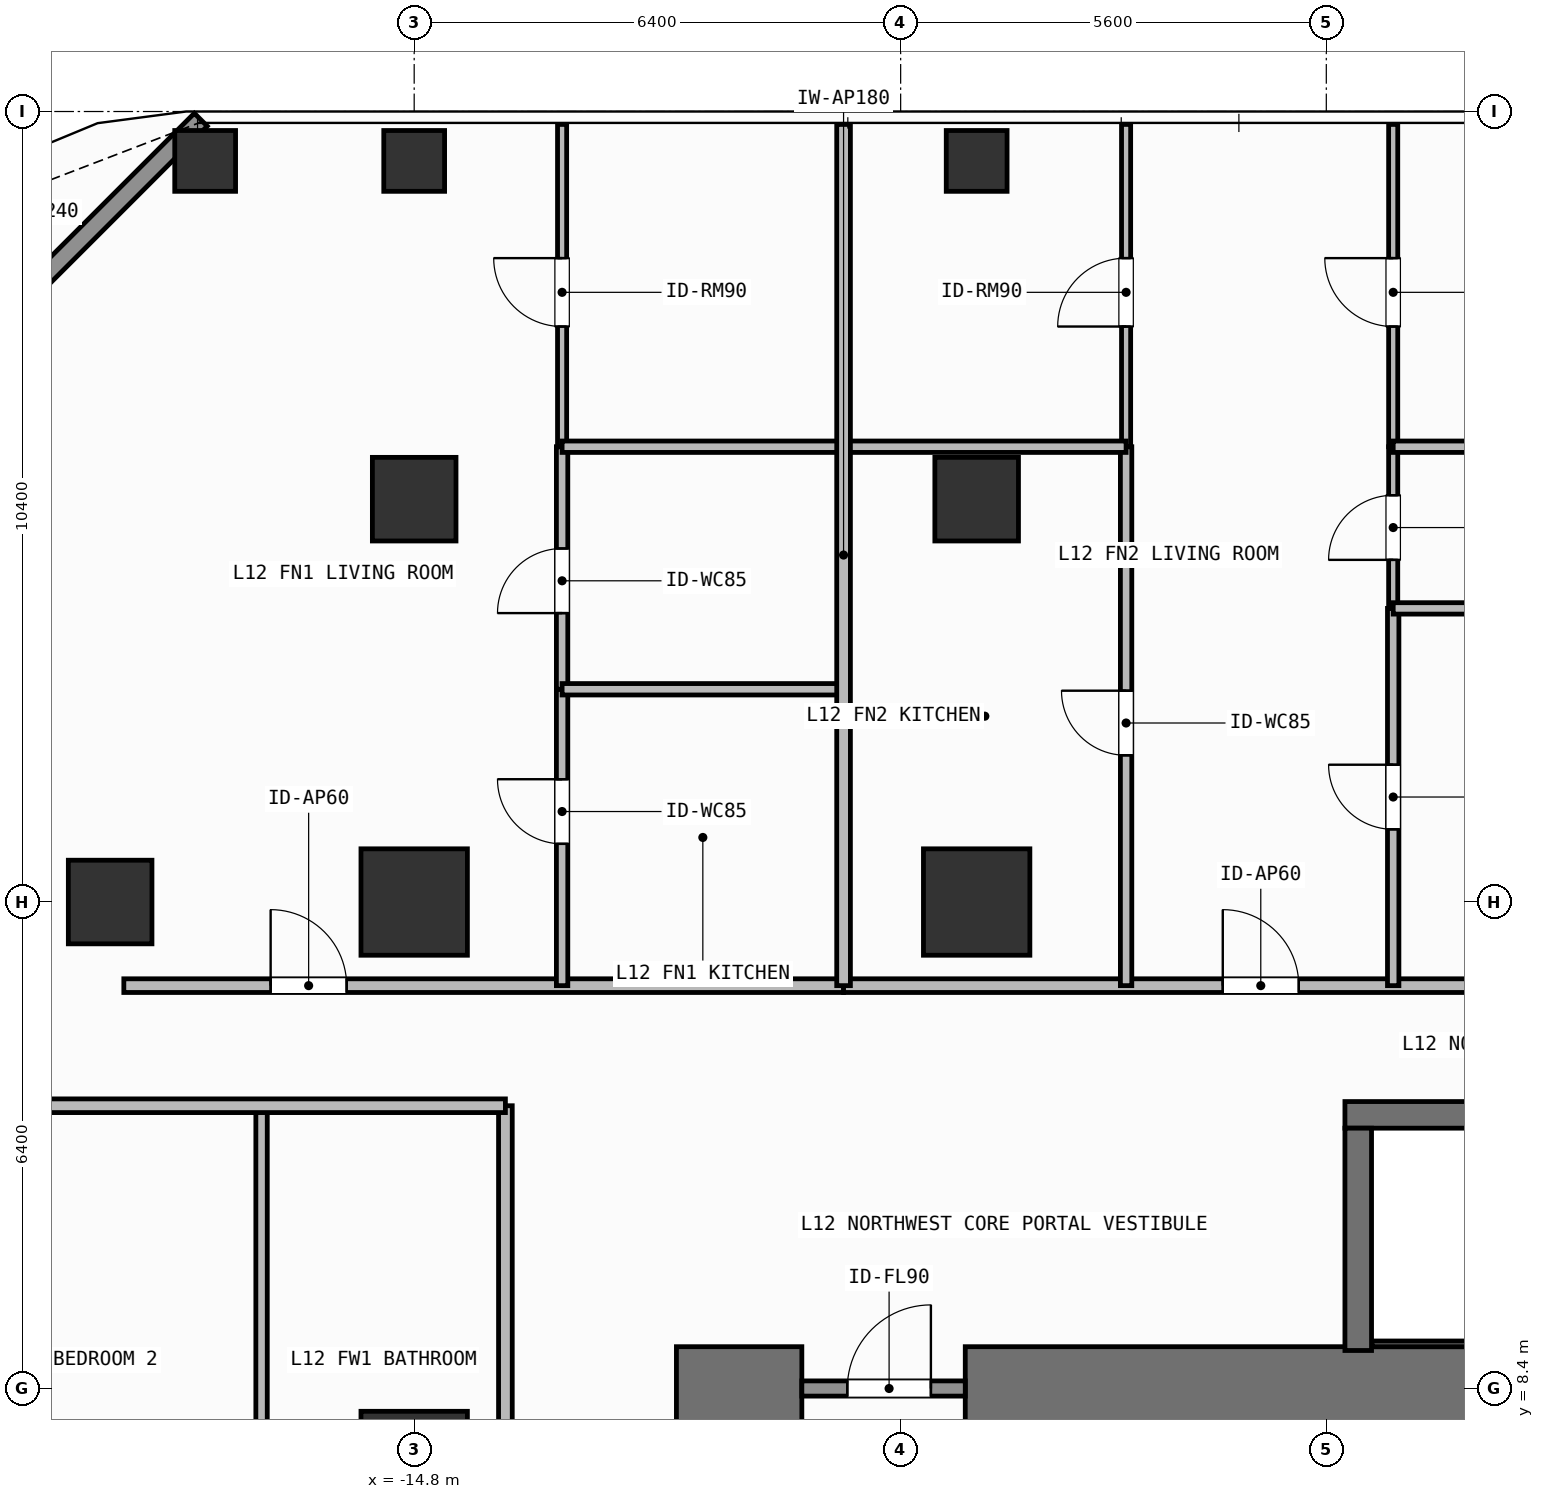
"""IFC4 building model, lengths in metres.
Left out: names, types, materials, properties, quantities, classifications, styles, units other than length and angle.
Written with IfcOpenShell. Run it as: python <this file> out.ifc"""

import sys

from ifc_helpers import new_model, si_unit, direction, frame, frame_2d, origin, origin_2d, place, context, subcontext, project, spatial, rectangle, hollow_rectangle, extrude, element, fill, save


model = new_model("IFC4")
c1 = context("Model", 3, precision=1e-05, world=origin(), true_north=direction((0.0, 1.0)))
c2 = subcontext(c1, "Body", "Model", "MODEL_VIEW")
j1 = project(units=[si_unit("LENGTHUNIT", "METRE"), si_unit("PLANEANGLEUNIT", "RADIAN")], contexts=[c1])
p1 = place(None, origin())
s1 = spatial("IfcSite", under=j1, at=p1, CompositionType="ELEMENT")
p2 = place(p1, origin())
s2 = spatial("IfcBuilding", under=s1, at=p2, CompositionType="ELEMENT")
p3 = place(p2, frame((0.0, 0.0, 46.2)))
s3 = spatial("IfcBuildingStorey", under=s2, at=p3, CompositionType="ELEMENT", Elevation=46.2)
p4 = place(p3, frame((-11.35, 8.4, 0.0), z_axis=(0.0, 0.0, 1.0), x_axis=(1.0, 0.0, 0.0)))
e1 = element("IfcWall", 1, at=p4, inside=s3, PredefinedType="SHEAR", context=c2, shape_type="SweptSolid", body=[
    extrude(rectangle(XDim=1.65, YDim=1.1, at=frame_2d((0.825, 0.0))), origin(), (0.0, 0.0, 1.0), 3.9),
])
p5 = place(p3, frame((-7.55, 8.4, 0.0), z_axis=(0.0, 0.0, 1.0), x_axis=(1.0, 0.0, 0.0)))
e2 = element("IfcWall", 2, at=p5, inside=s3, PredefinedType="SHEAR", context=c2, shape_type="SweptSolid", body=[
    extrude(rectangle(XDim=16.5, YDim=1.1, at=frame_2d((8.25, 0.0))), origin(), (0.0, 0.0, 1.0), 3.9),
])
p6 = place(p3, frame((-2.555, 12.0, 0.0), z_axis=(0.0, 0.0, 1.0), x_axis=(1.0, 0.0, 0.0)))
e3 = element("IfcWall", 3, at=p6, inside=s3, PredefinedType="SHEAR", context=c2, shape_type="SweptSolid", body=[
    extrude(rectangle(XDim=7.31, YDim=0.35, at=frame_2d((3.655, 0.0))), origin(), (0.0, 0.0, 1.0), 3.9),
])
p7 = place(p3, frame((-2.2, 8.988, 0.0), z_axis=(0.0, 0.0, 1.0), x_axis=(1.0, 0.0, 0.0)))
e4 = element("IfcWall", 4, at=p7, inside=s3, PredefinedType="SHEAR", context=c2, shape_type="SweptSolid", body=[
    extrude(rectangle(XDim=6.6, YDim=0.075, at=frame_2d((3.3, 0.0))), origin(), (0.0, 0.0, 1.0), 3.9),
])
p8 = place(p3, frame((-2.38, 8.9, 0.0), z_axis=(0.0, 0.0, 1.0), x_axis=(0.0, 1.0, 0.0)))
e5 = element("IfcWall", 5, at=p8, inside=s3, PredefinedType="SHEAR", context=c2, shape_type="SweptSolid", body=[
    extrude(rectangle(XDim=2.925, YDim=0.35, at=frame_2d((1.462, 0.0))), origin(), (0.0, 0.0, 1.0), 3.9),
])
for number, where, z_axis, x_axis in (
    (6, (-14.8, 14.8, 0.0), (0.0, 0.0, 1.0), (1.0, 0.0, 0.0)),
    (7, (-7.4, 14.8, 0.0), (0.0, 0.0, 1.0), (1.0, 0.0, 0.0)),
    (8, (-14.8, 7.4, 0.0), (0.0, 0.0, 1.0), (1.0, 0.0, 0.0)),
):
    element("IfcColumn", number, at=place(p3, frame(where, z_axis=z_axis, x_axis=x_axis)), inside=s3, PredefinedType="COLUMN", context=c2, shape_type="SweptSolid", body=[
        extrude(rectangle(XDim=1.4, YDim=1.4, at=origin_2d()), origin(), (0.0, 0.0, 1.0), 3.9),
    ])
for number, where, z_axis, x_axis in (
    (9, (-18.8, 14.8, 0.0), (0.0, 0.0, 1.0), (1.0, 0.0, 0.0)),
    (10, (-14.8, 20.1, 0.0), (0.0, 0.0, 1.0), (1.0, 0.0, 0.0)),
    (11, (-7.4, 20.1, 0.0), (0.0, 0.0, 1.0), (1.0, 0.0, 0.0)),
):
    element("IfcColumn", number, at=place(p3, frame(where, z_axis=z_axis, x_axis=x_axis)), inside=s3, PredefinedType="COLUMN", context=c2, shape_type="SweptSolid", body=[
        extrude(rectangle(XDim=1.1, YDim=1.1, at=origin_2d()), origin(), (0.0, 0.0, 1.0), 3.9),
    ])
for number, where, z_axis, x_axis in (
    (12, (-17.55, 24.55, 0.0), (0.0, 0.0, 1.0), (1.0, 0.0, 0.0)),
    (13, (-14.8, 24.55, 0.0), (0.0, 0.0, 1.0), (1.0, 0.0, 0.0)),
    (14, (-7.4, 24.55, 0.0), (0.0, 0.0, 1.0), (1.0, 0.0, 0.0)),
):
    element("IfcColumn", number, at=place(p3, frame(where, z_axis=z_axis, x_axis=x_axis)), inside=s3, PredefinedType="COLUMN", context=c2, shape_type="SweptSolid", body=[
        extrude(hollow_rectangle(XDim=0.8, YDim=0.8, WallThickness=0.036, at=origin_2d()), origin(), (0.0, 0.0, 1.0), 3.9),
    ])
p9 = place(p3, frame((-22.192, 20.508, 0.0), z_axis=(0.0, 0.0, 1.0), x_axis=(0.707106781187, 0.707106781187, 0.0)))
e15 = element("IfcWall", 15, at=p9, inside=s3, PredefinedType="SOLIDWALL", context=c2, shape_type="SweptSolid", body=[
    extrude(rectangle(XDim=6.484, YDim=0.24, at=frame_2d((3.242, 0.0))), origin(), (0.0, 0.0, 1.0), 3.68),
])
p10 = place(p3, frame((-9.7, 8.4, 0.0), z_axis=(0.0, 0.0, 1.0), x_axis=(1.0, 0.0, 0.0)))
e16 = element("IfcWall", 16, at=p10, inside=s3, PredefinedType="SOLIDWALL", context=c2, shape_type="SweptSolid", body=[
    extrude(rectangle(XDim=2.15, YDim=0.2, at=frame_2d((1.075, 0.0))), origin(), (0.0, 0.0, 1.0), 2.72),
])
p11 = place(p10, frame((0.598, 0.0, 0.0)))
e17 = element("IfcOpeningElement", 17, at=p11, cuts=e16, PredefinedType="OPENING", context=c2, shape_type="SweptSolid", body=[
    extrude(rectangle(XDim=1.1, YDim=2.15, at=frame_2d((0.55, 1.075))), frame((0.0, 0.11, 0.0), z_axis=(0.0, -1.0, 0.0), x_axis=(1.0, 0.0, 0.0)), (0.0, 0.0, 1.0), 0.22),
])
p12 = place(p3, frame((-18.62, 13.7, 0.0), z_axis=(0.0, 0.0, 1.0), x_axis=(1.0, 0.0, 0.0)))
e18 = element("IfcWall", 18, at=p12, inside=s3, PredefinedType="PARTITIONING", context=c2, shape_type="SweptSolid", body=[
    extrude(rectangle(XDim=9.469, YDim=0.18, at=frame_2d((4.735, 0.0))), origin(), (0.0, 0.0, 1.0), 3.68),
])
p13 = place(p12, frame((1.931, 0.0, 0.0)))
e19 = element("IfcOpeningElement", 19, at=p13, cuts=e18, PredefinedType="OPENING", context=c2, shape_type="SweptSolid", body=[
    extrude(rectangle(XDim=1.0, YDim=2.2, at=frame_2d((0.5, 1.1))), frame((0.0, 0.1, 0.0), z_axis=(0.0, -1.0, 0.0), x_axis=(1.0, 0.0, 0.0)), (0.0, 0.0, 1.0), 0.2),
])
p14 = place(p3, frame((-12.854, 13.7, 0.0), z_axis=(0.0, 0.0, 1.0), x_axis=(0.0, 1.0, 0.0)))
e20 = element("IfcWall", 20, at=p14, inside=s3, PredefinedType="PARTITIONING", context=c2, shape_type="SweptSolid", body=[
    extrude(rectangle(XDim=3.899, YDim=0.15, at=frame_2d((1.95, 0.0))), origin(), (0.0, 0.0, 1.0), 3.68),
])
p15 = place(p14, frame((1.865, 0.0, 0.0)))
e21 = element("IfcOpeningElement", 21, at=p15, cuts=e20, PredefinedType="OPENING", context=c2, shape_type="SweptSolid", body=[
    extrude(rectangle(XDim=0.85, YDim=2.1, at=frame_2d((0.425, 1.05))), frame((0.0, 0.085, 0.0), z_axis=(0.0, -1.0, 0.0), x_axis=(1.0, 0.0, 0.0)), (0.0, 0.0, 1.0), 0.17),
])
p16 = place(p3, frame((-12.854, 17.599, 0.0), z_axis=(0.0, 0.0, 1.0), x_axis=(0.0, 1.0, 0.0)))
e22 = element("IfcWall", 22, at=p16, inside=s3, PredefinedType="PARTITIONING", context=c2, shape_type="SweptSolid", body=[
    extrude(rectangle(XDim=3.191, YDim=0.15, at=frame_2d((1.595, 0.0))), origin(), (0.0, 0.0, 1.0), 3.68),
])
p17 = place(p16, frame((1.002, 0.0, 0.0)))
e23 = element("IfcOpeningElement", 23, at=p17, cuts=e22, PredefinedType="OPENING", context=c2, shape_type="SweptSolid", body=[
    extrude(rectangle(XDim=0.85, YDim=2.1, at=frame_2d((0.425, 1.05))), frame((0.0, 0.085, 0.0), z_axis=(0.0, -1.0, 0.0), x_axis=(1.0, 0.0, 0.0)), (0.0, 0.0, 1.0), 0.17),
])
p18 = place(p3, frame((-12.854, 20.79, 0.0), z_axis=(0.0, 0.0, 1.0), x_axis=(0.0, 1.0, 0.0)))
e24 = element("IfcWall", 24, at=p18, inside=s3, PredefinedType="PARTITIONING", context=c2, shape_type="SweptSolid", body=[
    extrude(rectangle(XDim=4.24, YDim=0.12, at=frame_2d((2.12, 0.0))), origin(), (0.0, 0.0, 1.0), 3.68),
])
p19 = place(p18, frame((1.581, 0.0, 0.0)))
e25 = element("IfcOpeningElement", 25, at=p19, cuts=e24, PredefinedType="OPENING", context=c2, shape_type="SweptSolid", body=[
    extrude(rectangle(XDim=0.9, YDim=2.1, at=frame_2d((0.45, 1.05))), frame((0.0, 0.07, 0.0), z_axis=(0.0, -1.0, 0.0), x_axis=(1.0, 0.0, 0.0)), (0.0, 0.0, 1.0), 0.14),
])
p20 = place(p3, frame((-9.151, 13.7, 0.0), z_axis=(0.0, 0.0, 1.0), x_axis=(1.0, 0.0, 0.0)))
e26 = element("IfcWall", 26, at=p20, inside=s3, PredefinedType="PARTITIONING", context=c2, shape_type="SweptSolid", body=[
    extrude(rectangle(XDim=12.051, YDim=0.18, at=frame_2d((6.025, 0.0))), origin(), (0.0, 0.0, 1.0), 3.68),
])
p21 = place(p20, frame((4.989, 0.0, 0.0)))
e27 = element("IfcOpeningElement", 27, at=p21, cuts=e26, PredefinedType="OPENING", context=c2, shape_type="SweptSolid", body=[
    extrude(rectangle(XDim=1.0, YDim=2.2, at=frame_2d((0.5, 1.1))), frame((0.0, 0.1, 0.0), z_axis=(0.0, -1.0, 0.0), x_axis=(1.0, 0.0, 0.0)), (0.0, 0.0, 1.0), 0.2),
])
p22 = place(p3, frame((-5.434, 13.7, 0.0), z_axis=(0.0, 0.0, 1.0), x_axis=(0.0, 1.0, 0.0)))
e28 = element("IfcWall", 28, at=p22, inside=s3, PredefinedType="PARTITIONING", context=c2, shape_type="SweptSolid", body=[
    extrude(rectangle(XDim=7.09, YDim=0.15, at=frame_2d((3.545, 0.0))), origin(), (0.0, 0.0, 1.0), 3.68),
])
p23 = place(p22, frame((3.03, 0.0, 0.0)))
e29 = element("IfcOpeningElement", 29, at=p23, cuts=e28, PredefinedType="OPENING", context=c2, shape_type="SweptSolid", body=[
    extrude(rectangle(XDim=0.85, YDim=2.1, at=frame_2d((0.425, 1.05))), frame((0.0, 0.085, 0.0), z_axis=(0.0, -1.0, 0.0), x_axis=(1.0, 0.0, 0.0)), (0.0, 0.0, 1.0), 0.17),
])
p24 = place(p3, frame((-5.434, 20.79, 0.0), z_axis=(0.0, 0.0, 1.0), x_axis=(0.0, 1.0, 0.0)))
e30 = element("IfcWall", 30, at=p24, inside=s3, PredefinedType="PARTITIONING", context=c2, shape_type="SweptSolid", body=[
    extrude(rectangle(XDim=4.24, YDim=0.12, at=frame_2d((2.12, 0.0))), origin(), (0.0, 0.0, 1.0), 3.68),
])
p25 = place(p24, frame((1.581, 0.0, 0.0)))
e31 = element("IfcOpeningElement", 31, at=p25, cuts=e30, PredefinedType="OPENING", context=c2, shape_type="SweptSolid", body=[
    extrude(rectangle(XDim=0.9, YDim=2.1, at=frame_2d((0.45, 1.05))), frame((0.0, 0.07, 0.0), z_axis=(0.0, -1.0, 0.0), x_axis=(1.0, 0.0, 0.0)), (0.0, 0.0, 1.0), 0.14),
])
p26 = place(p3, frame((-1.92, 13.7, 0.0), z_axis=(0.0, 0.0, 1.0), x_axis=(0.0, 1.0, 0.0)))
e32 = element("IfcWall", 32, at=p26, inside=s3, PredefinedType="PARTITIONING", context=c2, shape_type="SweptSolid", body=[
    extrude(rectangle(XDim=4.963, YDim=0.15, at=frame_2d((2.481, 0.0))), origin(), (0.0, 0.0, 1.0), 3.68),
])
p27 = place(p26, frame((2.056, 0.0, 0.0)))
e33 = element("IfcOpeningElement", 33, at=p27, cuts=e32, PredefinedType="OPENING", context=c2, shape_type="SweptSolid", body=[
    extrude(rectangle(XDim=0.85, YDim=2.1, at=frame_2d((0.425, 1.05))), frame((0.0, 0.085, 0.0), z_axis=(0.0, -1.0, 0.0), x_axis=(1.0, 0.0, 0.0)), (0.0, 0.0, 1.0), 0.17),
])
p28 = place(p3, frame((-1.92, 18.663, 0.0), z_axis=(0.0, 0.0, 1.0), x_axis=(0.0, 1.0, 0.0)))
e34 = element("IfcWall", 34, at=p28, inside=s3, PredefinedType="PARTITIONING", context=c2, shape_type="SweptSolid", body=[
    extrude(rectangle(XDim=2.127, YDim=0.12, at=frame_2d((1.063, 0.0))), origin(), (0.0, 0.0, 1.0), 3.68),
])
p29 = place(p28, frame((0.638, 0.0, 0.0)))
e35 = element("IfcOpeningElement", 35, at=p29, cuts=e34, PredefinedType="OPENING", context=c2, shape_type="SweptSolid", body=[
    extrude(rectangle(XDim=0.85, YDim=2.1, at=frame_2d((0.425, 1.05))), frame((0.0, 0.07, 0.0), z_axis=(0.0, -1.0, 0.0), x_axis=(1.0, 0.0, 0.0)), (0.0, 0.0, 1.0), 0.14),
])
p30 = place(p3, frame((-1.92, 20.79, 0.0), z_axis=(0.0, 0.0, 1.0), x_axis=(0.0, 1.0, 0.0)))
e36 = element("IfcWall", 36, at=p30, inside=s3, PredefinedType="PARTITIONING", context=c2, shape_type="SweptSolid", body=[
    extrude(rectangle(XDim=4.24, YDim=0.12, at=frame_2d((2.12, 0.0))), origin(), (0.0, 0.0, 1.0), 3.68),
])
p31 = place(p30, frame((1.581, 0.0, 0.0)))
e37 = element("IfcOpeningElement", 37, at=p31, cuts=e36, PredefinedType="OPENING", context=c2, shape_type="SweptSolid", body=[
    extrude(rectangle(XDim=0.9, YDim=2.1, at=frame_2d((0.45, 1.05))), frame((0.0, 0.07, 0.0), z_axis=(0.0, -1.0, 0.0), x_axis=(1.0, 0.0, 0.0)), (0.0, 0.0, 1.0), 0.14),
])
p32 = place(p3, frame((-13.6, -12.12, 0.0), z_axis=(0.0, 0.0, 1.0), x_axis=(0.0, 1.0, 0.0)))
e38 = element("IfcWall", 38, at=p32, inside=s3, PredefinedType="PARTITIONING", context=c2, shape_type="SweptSolid", body=[
    extrude(rectangle(XDim=24.24, YDim=0.18, at=frame_2d((12.12, 0.0))), origin(), (0.0, 0.0, 1.0), 3.68),
])
p33 = place(p32, frame((9.829, 0.0, 0.0)))
e39 = element("IfcOpeningElement", 39, at=p33, cuts=e38, PredefinedType="OPENING", context=c2, shape_type="SweptSolid", body=[
    extrude(rectangle(XDim=1.0, YDim=2.2, at=frame_2d((0.5, 1.1))), frame((0.0, 0.1, 0.0), z_axis=(0.0, -1.0, 0.0), x_axis=(1.0, 0.0, 0.0)), (0.0, 0.0, 1.0), 0.2),
])
for number, where, z_axis, x_axis in (
    (40, (-12.854, 17.599, 0.0), (0.0, 0.0, 1.0), (1.0, 0.0, 0.0)),
    (41, (-12.854, 20.79, 0.0), (0.0, 0.0, 1.0), (1.0, 0.0, 0.0)),
):
    element("IfcWall", number, at=place(p3, frame(where, z_axis=z_axis, x_axis=x_axis)), inside=s3, PredefinedType="PARTITIONING", context=c2, shape_type="SweptSolid", body=[
        extrude(rectangle(XDim=3.703, YDim=0.15, at=frame_2d((1.852, 0.0))), origin(), (0.0, 0.0, 1.0), 3.68),
    ])
p34 = place(p3, frame((-9.151, 20.79, 0.0), z_axis=(0.0, 0.0, 1.0), x_axis=(1.0, 0.0, 0.0)))
e42 = element("IfcWall", 42, at=p34, inside=s3, PredefinedType="PARTITIONING", context=c2, shape_type="SweptSolid", body=[
    extrude(rectangle(XDim=3.717, YDim=0.15, at=frame_2d((1.858, 0.0))), origin(), (0.0, 0.0, 1.0), 3.68),
])
for number, where, z_axis, x_axis in (
    (43, (-1.92, 18.663, 0.0), (0.0, 0.0, 1.0), (1.0, 0.0, 0.0)),
    (44, (-1.92, 20.79, 0.0), (0.0, 0.0, 1.0), (1.0, 0.0, 0.0)),
):
    element("IfcWall", number, at=place(p3, frame(where, z_axis=z_axis, x_axis=x_axis)), inside=s3, PredefinedType="PARTITIONING", context=c2, shape_type="SweptSolid", body=[
        extrude(rectangle(XDim=4.82, YDim=0.15, at=frame_2d((2.41, 0.0))), origin(), (0.0, 0.0, 1.0), 3.68),
    ])
p35 = place(p3, frame((-9.151, 13.7, 0.0), z_axis=(0.0, 0.0, 1.0), x_axis=(0.0, 1.0, 0.0)))
e45 = element("IfcWall", 45, at=p35, inside=s3, PredefinedType="PARTITIONING", context=c2, shape_type="SweptSolid", body=[
    extrude(rectangle(XDim=11.33, YDim=0.18, at=frame_2d((5.665, 0.0))), origin(), (0.0, 0.0, 1.0), 3.68),
])
p36 = place(p3, frame((-16.808, 5.436, 0.0), z_axis=(0.0, 0.0, 1.0), x_axis=(0.0, 1.0, 0.0)))
e46 = element("IfcWall", 46, at=p36, inside=s3, PredefinedType="PARTITIONING", context=c2, shape_type="SweptSolid", body=[
    extrude(rectangle(XDim=6.684, YDim=0.15, at=frame_2d((3.342, 0.0))), origin(), (0.0, 0.0, 1.0), 3.68),
])
p37 = place(p3, frame((-22.13, 12.12, 0.0), z_axis=(0.0, 0.0, 1.0), x_axis=(1.0, 0.0, 0.0)))
e47 = element("IfcWall", 47, at=p37, inside=s3, PredefinedType="PARTITIONING", context=c2, shape_type="SweptSolid", body=[
    extrude(rectangle(XDim=8.53, YDim=0.18, at=frame_2d((4.265, 0.0))), origin(), (0.0, 0.0, 1.0), 3.68),
])
p38 = place(p11, origin())
e48 = element("IfcDoor", 48, at=p38, inside=s3, OperationType="SINGLE_SWING_RIGHT", PredefinedType="DOOR", context=c2, shape_type="SweptSolid", body=[
    extrude(rectangle(XDim=1.1, YDim=2.15, at=frame_2d((0.55, 1.075))), frame((0.0, 0.025, 0.0), z_axis=(0.0, -1.0, 0.0), x_axis=(1.0, 0.0, 0.0)), (0.0, 0.0, 1.0), 0.05),
])
fill(e17, e48)
p39 = place(p13, origin())
e49 = element("IfcDoor", 49, at=p39, inside=s3, OperationType="SINGLE_SWING_LEFT", PredefinedType="DOOR", context=c2, shape_type="SweptSolid", body=[
    extrude(rectangle(XDim=1.0, YDim=2.2, at=frame_2d((0.5, 1.1))), frame((0.0, 0.025, 0.0), z_axis=(0.0, -1.0, 0.0), x_axis=(1.0, 0.0, 0.0)), (0.0, 0.0, 1.0), 0.05),
])
fill(e19, e49)
p40 = place(p15, origin())
e50 = element("IfcDoor", 50, at=p40, inside=s3, OperationType="SINGLE_SWING_RIGHT", PredefinedType="DOOR", context=c2, shape_type="SweptSolid", body=[
    extrude(rectangle(XDim=0.85, YDim=2.1, at=frame_2d((0.425, 1.05))), frame((0.0, 0.025, 0.0), z_axis=(0.0, -1.0, 0.0), x_axis=(1.0, 0.0, 0.0)), (0.0, 0.0, 1.0), 0.05),
])
fill(e21, e50)
p41 = place(p17, origin())
e51 = element("IfcDoor", 51, at=p41, inside=s3, OperationType="SINGLE_SWING_LEFT", PredefinedType="DOOR", context=c2, shape_type="SweptSolid", body=[
    extrude(rectangle(XDim=0.85, YDim=2.1, at=frame_2d((0.425, 1.05))), frame((0.0, 0.025, 0.0), z_axis=(0.0, -1.0, 0.0), x_axis=(1.0, 0.0, 0.0)), (0.0, 0.0, 1.0), 0.05),
])
fill(e23, e51)
p42 = place(p19, origin())
e52 = element("IfcDoor", 52, at=p42, inside=s3, OperationType="SINGLE_SWING_RIGHT", PredefinedType="DOOR", context=c2, shape_type="SweptSolid", body=[
    extrude(rectangle(XDim=0.9, YDim=2.1, at=frame_2d((0.45, 1.05))), frame((0.0, 0.025, 0.0), z_axis=(0.0, -1.0, 0.0), x_axis=(1.0, 0.0, 0.0)), (0.0, 0.0, 1.0), 0.05),
])
fill(e25, e52)
p43 = place(p21, origin())
e53 = element("IfcDoor", 53, at=p43, inside=s3, OperationType="SINGLE_SWING_LEFT", PredefinedType="DOOR", context=c2, shape_type="SweptSolid", body=[
    extrude(rectangle(XDim=1.0, YDim=2.2, at=frame_2d((0.5, 1.1))), frame((0.0, 0.025, 0.0), z_axis=(0.0, -1.0, 0.0), x_axis=(1.0, 0.0, 0.0)), (0.0, 0.0, 1.0), 0.05),
])
fill(e27, e53)
p44 = place(p23, origin())
e54 = element("IfcDoor", 54, at=p44, inside=s3, OperationType="SINGLE_SWING_RIGHT", PredefinedType="DOOR", context=c2, shape_type="SweptSolid", body=[
    extrude(rectangle(XDim=0.85, YDim=2.1, at=frame_2d((0.425, 1.05))), frame((0.0, 0.025, 0.0), z_axis=(0.0, -1.0, 0.0), x_axis=(1.0, 0.0, 0.0)), (0.0, 0.0, 1.0), 0.05),
])
fill(e29, e54)
p45 = place(p25, origin())
e55 = element("IfcDoor", 55, at=p45, inside=s3, OperationType="SINGLE_SWING_LEFT", PredefinedType="DOOR", context=c2, shape_type="SweptSolid", body=[
    extrude(rectangle(XDim=0.9, YDim=2.1, at=frame_2d((0.45, 1.05))), frame((0.0, 0.025, 0.0), z_axis=(0.0, -1.0, 0.0), x_axis=(1.0, 0.0, 0.0)), (0.0, 0.0, 1.0), 0.05),
])
fill(e31, e55)
p46 = place(p27, origin())
e56 = element("IfcDoor", 56, at=p46, inside=s3, OperationType="SINGLE_SWING_RIGHT", PredefinedType="DOOR", context=c2, shape_type="SweptSolid", body=[
    extrude(rectangle(XDim=0.85, YDim=2.1, at=frame_2d((0.425, 1.05))), frame((0.0, 0.025, 0.0), z_axis=(0.0, -1.0, 0.0), x_axis=(1.0, 0.0, 0.0)), (0.0, 0.0, 1.0), 0.05),
])
fill(e33, e56)
p47 = place(p29, origin())
e57 = element("IfcDoor", 57, at=p47, inside=s3, OperationType="SINGLE_SWING_LEFT", PredefinedType="DOOR", context=c2, shape_type="SweptSolid", body=[
    extrude(rectangle(XDim=0.85, YDim=2.1, at=frame_2d((0.425, 1.05))), frame((0.0, 0.025, 0.0), z_axis=(0.0, -1.0, 0.0), x_axis=(1.0, 0.0, 0.0)), (0.0, 0.0, 1.0), 0.05),
])
fill(e35, e57)
p48 = place(p31, origin())
e58 = element("IfcDoor", 58, at=p48, inside=s3, OperationType="SINGLE_SWING_RIGHT", PredefinedType="DOOR", context=c2, shape_type="SweptSolid", body=[
    extrude(rectangle(XDim=0.9, YDim=2.1, at=frame_2d((0.45, 1.05))), frame((0.0, 0.025, 0.0), z_axis=(0.0, -1.0, 0.0), x_axis=(1.0, 0.0, 0.0)), (0.0, 0.0, 1.0), 0.05),
])
fill(e37, e58)
save(model, sys.argv[1])
